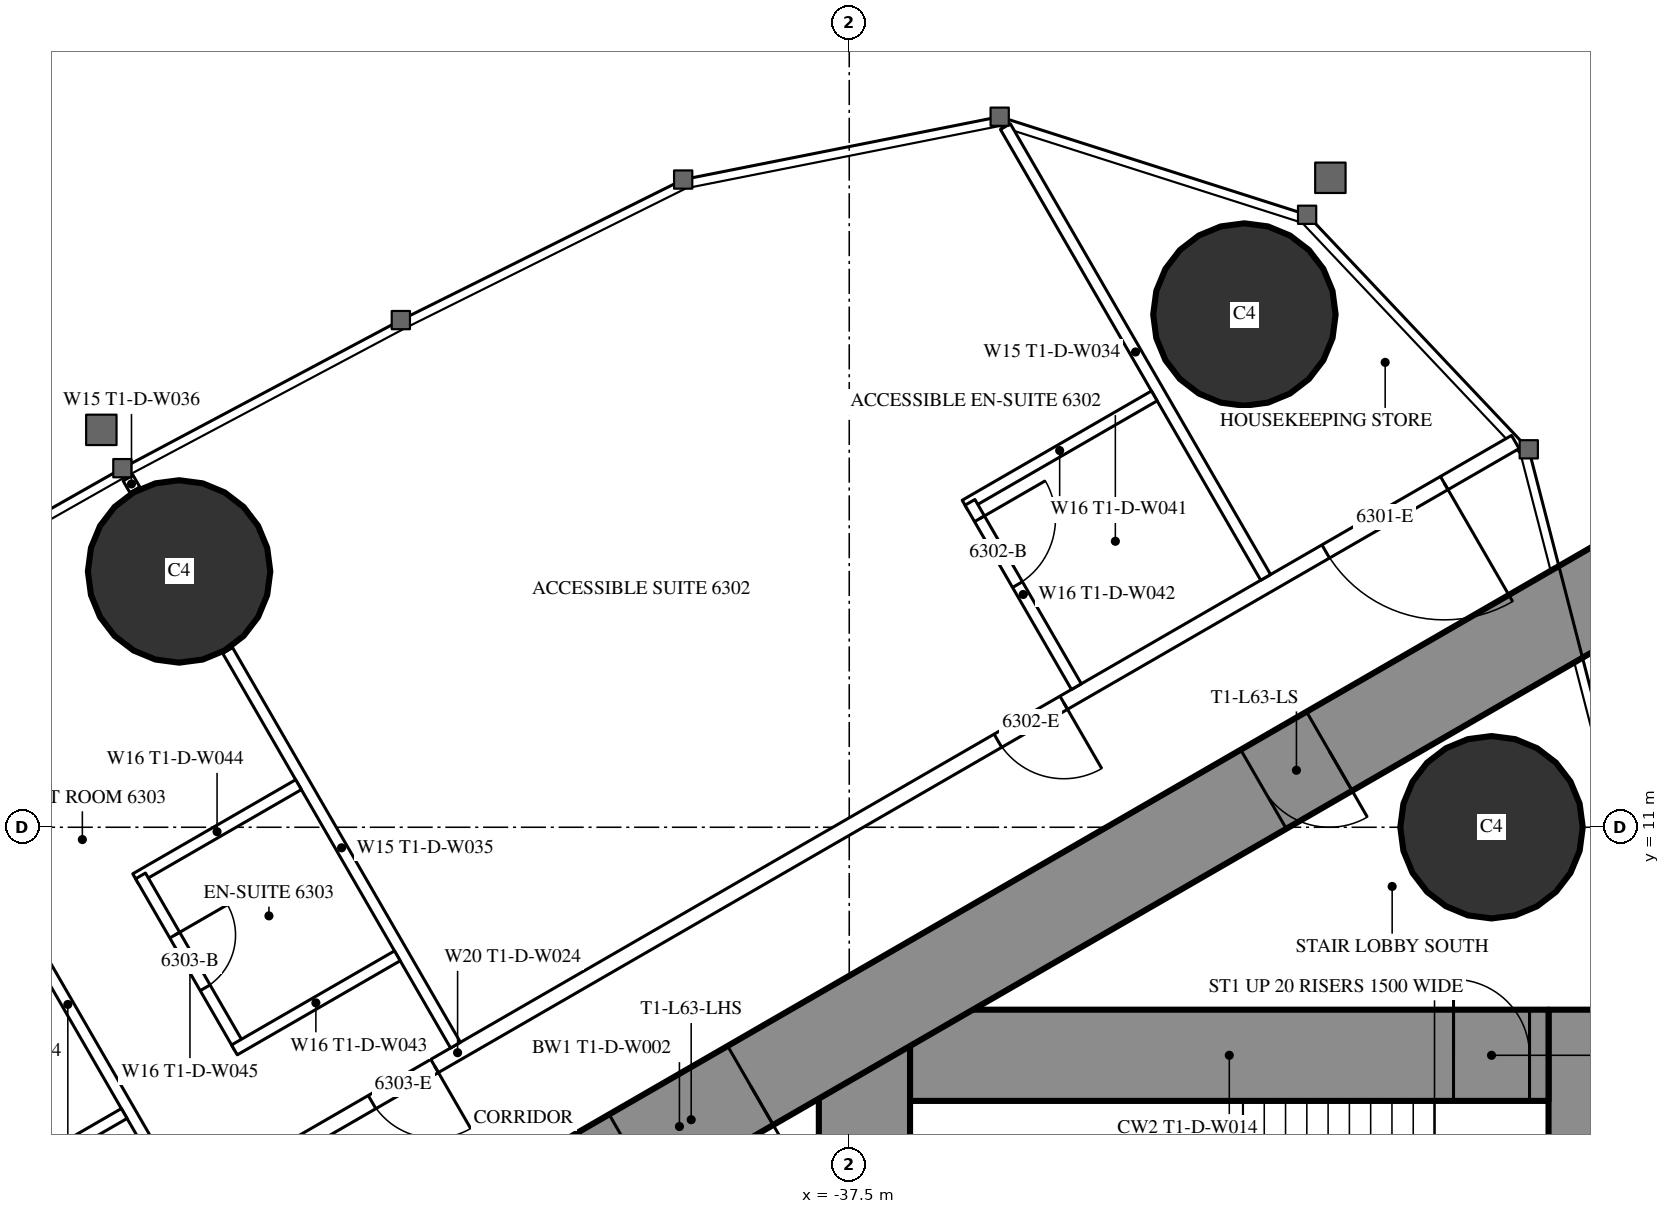
"""IFC4 building model, lengths in metres.
Left out: names, types, materials, properties, quantities, classifications, styles, units other than length and angle.
Written with IfcOpenShell. Run it as: python <this file> out.ifc"""

import sys

from ifc_helpers import new_model, si_unit, direction, frame, frame_2d, origin, origin_2d, place, context, subcontext, project, spatial, rectangle, circle, extrude, element, fill, save


model = new_model("IFC4")
c1 = context("Model", 3, precision=1e-05, world=origin(), true_north=direction((0.0, 1.0)))
c2 = subcontext(c1, "Body", "Model", "MODEL_VIEW")
j1 = project(units=[si_unit("LENGTHUNIT", "METRE"), si_unit("PLANEANGLEUNIT", "RADIAN")], contexts=[c1])
p1 = place(None, origin())
s1 = spatial("IfcSite", under=j1, at=p1, CompositionType="ELEMENT")
p2 = place(p1, origin())
s2 = spatial("IfcBuilding", under=s1, at=p2, CompositionType="ELEMENT")
p3 = place(p2, frame((0.0, 0.0, 236.9)))
s3 = spatial("IfcBuildingStorey", under=s2, at=p3, CompositionType="ELEMENT", Elevation=236.9)
for number, where, z_axis, x_axis in (
    (1, (-32.301, 17.745, 0.0), (0.0, 0.0, 1.0), (1.0, 0.0, 0.0)),
    (2, (-29.05, 11.0, 0.0), (0.0, 0.0, 1.0), (1.0, 0.0, 0.0)),
    (3, (-46.317, 14.365, 0.0), (0.0, 0.0, 1.0), (1.0, 0.0, 0.0)),
):
    element("IfcColumn", number, at=place(p3, frame(where, z_axis=z_axis, x_axis=x_axis)), inside=s3, PredefinedType="COLUMN", context=c2, shape_type="SweptSolid", body=[
        extrude(circle(Radius=1.2, at=origin_2d()), origin(), (0.0, 0.0, 1.0), 3.6),
    ])
p4 = place(p3, frame((-27.9, 8.6, 0.0), z_axis=(0.0, 0.0, 1.0), x_axis=(0.0, -1.0, 0.0)))
e4 = element("IfcWall", 4, at=p4, inside=s3, PredefinedType="SHEAR", context=c2, shape_type="SweptSolid", body=[
    extrude(rectangle(XDim=17.2, YDim=0.8, at=frame_2d((8.6, 0.0))), origin(), (0.0, 0.0, 1.0), 3.6),
])
p5 = place(p4, frame((6.95, 0.0, 0.0)))
e5 = element("IfcOpeningElement", 5, at=p5, cuts=e4, PredefinedType="OPENING", context=c2, shape_type="SweptSolid", body=[
    extrude(rectangle(XDim=0.9, YDim=2.2, at=frame_2d((0.45, 1.1))), frame((0.0, 0.41, 0.0), z_axis=(0.0, -1.0, 0.0), x_axis=(1.0, 0.0, 0.0)), (0.0, 0.0, 1.0), 0.82),
])
p6 = place(p3, frame((-37.3, 8.6, 0.0), z_axis=(0.0, 0.0, 1.0), x_axis=(0.0, -1.0, 0.0)))
e6 = element("IfcWall", 6, at=p6, inside=s3, PredefinedType="SHEAR", context=c2, shape_type="SweptSolid", body=[
    extrude(rectangle(XDim=17.2, YDim=1.2, at=frame_2d((8.6, 0.0))), origin(), (0.0, 0.0, 1.0), 3.6),
])
p7 = place(p6, frame((7.7, 0.0, 0.0)))
e7 = element("IfcOpeningElement", 7, at=p7, cuts=e6, PredefinedType="OPENING", context=c2, shape_type="SweptSolid", body=[
    extrude(rectangle(XDim=1.8, YDim=2.2, at=frame_2d((0.9, 1.1))), frame((0.0, 0.61, 0.0), z_axis=(0.0, -1.0, 0.0), x_axis=(1.0, 0.0, 0.0)), (0.0, 0.0, 1.0), 1.22),
])
p8 = place(p3, frame((-28.3, 8.0, 0.0), z_axis=(0.0, 0.0, 1.0), x_axis=(-1.0, 0.0, 0.0)))
e8 = element("IfcWall", 8, at=p8, inside=s3, PredefinedType="SHEAR", context=c2, shape_type="SweptSolid", body=[
    extrude(rectangle(XDim=8.4, YDim=1.2, at=frame_2d((4.2, 0.0))), origin(), (0.0, 0.0, 1.0), 3.6),
])
p9 = place(p8, frame((0.25, 0.0, 0.0)))
e9 = element("IfcOpeningElement", 9, at=p9, cuts=e8, PredefinedType="OPENING", context=c2, shape_type="SweptSolid", body=[
    extrude(rectangle(XDim=1.0, YDim=2.2, at=frame_2d((0.5, 1.1))), frame((0.0, 0.61, 0.0), z_axis=(0.0, -1.0, 0.0), x_axis=(1.0, 0.0, 0.0)), (0.0, 0.0, 1.0), 1.22),
])
p10 = place(p3, frame((-27.2, 14.3, 0.0), z_axis=(0.0, 0.0, 1.0), x_axis=(-0.866026593062, -0.499997940104, 0.0)))
e10 = element("IfcWall", 10, at=p10, inside=s3, PredefinedType="SHEAR", context=c2, shape_type="SweptSolid", body=[
    extrude(rectangle(XDim=28.946, YDim=1.2, at=frame_2d((14.473, 0.0))), origin(), (0.0, 0.0, 1.0), 3.6),
])
p11 = place(p10, frame((4.6, 0.0, 0.0)))
e11 = element("IfcOpeningElement", 11, at=p11, cuts=e10, PredefinedType="OPENING", context=c2, shape_type="SweptSolid", body=[
    extrude(rectangle(XDim=1.0, YDim=2.2, at=frame_2d((0.5, 1.1))), frame((0.0, 0.61, 0.0), z_axis=(0.0, -1.0, 0.0), x_axis=(1.0, 0.0, 0.0)), (0.0, 0.0, 1.0), 1.22),
])
p12 = place(p10, frame((13.395, 0.0, 0.0)))
e12 = element("IfcOpeningElement", 12, at=p12, cuts=e10, PredefinedType="OPENING", context=c2, shape_type="SweptSolid", body=[
    extrude(rectangle(XDim=1.8, YDim=2.2, at=frame_2d((0.9, 1.1))), frame((0.0, 0.61, 0.0), z_axis=(0.0, -1.0, 0.0), x_axis=(1.0, 0.0, 0.0)), (0.0, 0.0, 1.0), 1.22),
])
p13 = place(p3, frame((-28.737, 16.068, 0.0), z_axis=(0.0, 0.0, 1.0), x_axis=(-0.866026057212, -0.499998868229, 0.0)))
e13 = element("IfcWall", 13, at=p13, inside=s3, PredefinedType="PARTITIONING", context=c2, shape_type="SweptSolid", body=[
    extrude(rectangle(XDim=32.137, YDim=0.2, at=frame_2d((16.068, 0.0))), origin(), (0.0, 0.0, 1.0), 3.35),
])
p14 = place(p13, frame((1.08, 0.0, 0.0)))
e14 = element("IfcOpeningElement", 14, at=p14, cuts=e13, PredefinedType="OPENING", context=c2, shape_type="SweptSolid", body=[
    extrude(rectangle(XDim=1.8, YDim=2.03, at=frame_2d((0.9, 1.015))), frame((0.0, 0.11, 0.0), z_axis=(0.0, -1.0, 0.0), x_axis=(1.0, 0.0, 0.0)), (0.0, 0.0, 1.0), 0.22),
])
p15 = place(p13, frame((6.86, 0.0, 0.0)))
e15 = element("IfcOpeningElement", 15, at=p15, cuts=e13, PredefinedType="OPENING", context=c2, shape_type="SweptSolid", body=[
    extrude(rectangle(XDim=1.0, YDim=2.2, at=frame_2d((0.5, 1.1))), frame((0.0, 0.11, 0.0), z_axis=(0.0, -1.0, 0.0), x_axis=(1.0, 0.0, 0.0)), (0.0, 0.0, 1.0), 0.22),
])
p16 = place(p13, frame((16.418, 0.0, 0.0)))
e16 = element("IfcOpeningElement", 16, at=p16, cuts=e13, PredefinedType="OPENING", context=c2, shape_type="SweptSolid", body=[
    extrude(rectangle(XDim=0.95, YDim=2.2, at=frame_2d((0.475, 1.1))), frame((0.0, 0.11, 0.0), z_axis=(0.0, -1.0, 0.0), x_axis=(1.0, 0.0, 0.0)), (0.0, 0.0, 1.0), 0.22),
])
p17 = place(p13, frame((20.567, 0.0, 0.0)))
e17 = element("IfcOpeningElement", 17, at=p17, cuts=e13, PredefinedType="OPENING", context=c2, shape_type="SweptSolid", body=[
    extrude(rectangle(XDim=0.95, YDim=2.2, at=frame_2d((0.475, 1.1))), frame((0.0, 0.11, 0.0), z_axis=(0.0, -1.0, 0.0), x_axis=(1.0, 0.0, 0.0)), (0.0, 0.0, 1.0), 0.22),
])
p18 = place(p13, frame((27.065, 0.0, 0.0)))
e18 = element("IfcOpeningElement", 18, at=p18, cuts=e13, PredefinedType="OPENING", context=c2, shape_type="SweptSolid", body=[
    extrude(rectangle(XDim=0.95, YDim=2.2, at=frame_2d((0.475, 1.1))), frame((0.0, 0.11, 0.0), z_axis=(0.0, -1.0, 0.0), x_axis=(1.0, 0.0, 0.0)), (0.0, 0.0, 1.0), 0.22),
])
p19 = place(p3, frame((-32.022, 14.287, 0.0), z_axis=(0.0, 0.0, 1.0), x_axis=(-0.50000019414, 0.866025291697, 0.0)))
e19 = element("IfcWall", 19, at=p19, inside=s3, PredefinedType="PARTITIONING", context=c2, shape_type="SweptSolid", body=[
    extrude(rectangle(XDim=6.848, YDim=0.15, at=frame_2d((3.424, 0.0))), origin(), (0.0, 0.0, 1.0), 3.35),
])
p20 = place(p3, frame((-42.68, 8.134, 0.0), z_axis=(0.0, 0.0, 1.0), x_axis=(-0.499984479505, 0.866034364361, 0.0)))
e20 = element("IfcWall", 20, at=p20, inside=s3, PredefinedType="PARTITIONING", context=c2, shape_type="SweptSolid", body=[
    extrude(rectangle(XDim=5.995, YDim=0.15, at=frame_2d((2.998, 0.0))), origin(), (0.0, 0.0, 1.0), 2.45),
])
p21 = place(p3, frame((-46.898, 15.439, 0.0), z_axis=(0.0, 0.0, 1.0), x_axis=(-0.500232303069, 0.865891241997, 0.0)))
e21 = element("IfcWall", 21, at=p21, inside=s3, PredefinedType="PARTITIONING", context=c2, shape_type="SweptSolid", body=[
    extrude(rectangle(XDim=0.18, YDim=0.15, at=frame_2d((0.09, 0.0))), origin(), (0.0, 0.0, 1.0), 2.45),
])
p22 = place(p3, frame((-46.274, 6.059, 0.0), z_axis=(0.0, 0.0, 1.0), x_axis=(-0.500020471368, 0.866013584312, 0.0)))
e22 = element("IfcWall", 22, at=p22, inside=s3, PredefinedType="PARTITIONING", context=c2, shape_type="SweptSolid", body=[
    extrude(rectangle(XDim=6.028, YDim=0.15, at=frame_2d((3.014, 0.0))), origin(), (0.0, 0.0, 1.0), 2.45),
])
p23 = place(p3, frame((-33.487, 16.675, 0.0), z_axis=(0.0, 0.0, 1.0), x_axis=(-0.866039941686, -0.499974818771, 0.0)))
e23 = element("IfcWall", 23, at=p23, inside=s3, PredefinedType="PARTITIONING", context=c2, shape_type="SweptSolid", body=[
    extrude(rectangle(XDim=2.875, YDim=0.15, at=frame_2d((1.438, 0.0))), origin(), (0.0, 0.0, 1.0), 3.35),
])
p24 = place(p3, frame((-34.511, 12.85, 0.0), z_axis=(0.0, 0.0, 1.0), x_axis=(-0.500011755427, 0.866018616679, 0.0)))
e24 = element("IfcWall", 24, at=p24, inside=s3, PredefinedType="PARTITIONING", context=c2, shape_type="SweptSolid", body=[
    extrude(rectangle(XDim=2.8, YDim=0.15, at=frame_2d((1.4, 0.0))), origin(), (0.0, 0.0, 1.0), 3.35),
])
p25 = place(p24, frame((1.55, 0.0, 0.0)))
e25 = element("IfcOpeningElement", 25, at=p25, cuts=e24, PredefinedType="OPENING", context=c2, shape_type="SweptSolid", body=[
    extrude(rectangle(XDim=1.0, YDim=2.2, at=frame_2d((0.5, 1.1))), frame((0.0, 0.085, 0.0), z_axis=(0.0, -1.0, 0.0), x_axis=(1.0, 0.0, 0.0)), (0.0, 0.0, 1.0), 0.17),
])
p26 = place(p3, frame((-44.745, 11.56, 0.0), z_axis=(0.0, 0.0, 1.0), x_axis=(-0.866006523861, -0.500032699561, 0.0)))
e26 = element("IfcWall", 26, at=p26, inside=s3, PredefinedType="PARTITIONING", context=c2, shape_type="SweptSolid", body=[
    extrude(rectangle(XDim=2.475, YDim=0.15, at=frame_2d((1.237, 0.0))), origin(), (0.0, 0.0, 1.0), 3.35),
])
p27 = place(p3, frame((-45.524, 8.109, 0.0), z_axis=(0.0, 0.0, 1.0), x_axis=(-0.49997716683, 0.86603858612, 0.0)))
e27 = element("IfcWall", 27, at=p27, inside=s3, PredefinedType="PARTITIONING", context=c2, shape_type="SweptSolid", body=[
    extrude(rectangle(XDim=2.6, YDim=0.15, at=frame_2d((1.3, 0.0))), origin(), (0.0, 0.0, 1.0), 3.35),
])
p28 = place(p27, frame((0.9, 0.0, 0.0)))
e28 = element("IfcOpeningElement", 28, at=p28, cuts=e27, PredefinedType="OPENING", context=c2, shape_type="SweptSolid", body=[
    extrude(rectangle(XDim=0.8, YDim=2.2, at=frame_2d((0.4, 1.1))), frame((0.0, 0.085, 0.0), z_axis=(0.0, -1.0, 0.0), x_axis=(1.0, 0.0, 0.0)), (0.0, 0.0, 1.0), 0.17),
])
for number, where, z_axis, x_axis in (
    (29, (-43.445, 9.309, 0.0), (0.0, 0.0, 1.0), (-0.866, -0.5, 0.0)),
    (30, (-47.039, 7.234, 0.0), (0.0, 0.0, 1.0), (-0.866, -0.5, 0.0)),
):
    element("IfcWall", number, at=place(p3, frame(where, z_axis=z_axis, x_axis=x_axis)), inside=s3, PredefinedType="PARTITIONING", context=c2, shape_type="SweptSolid", body=[
        extrude(rectangle(XDim=2.475, YDim=0.15, at=frame_2d((1.238, 0.0))), origin(), (0.0, 0.0, 1.0), 3.35),
    ])
p29 = place(p14, origin())
e31 = element("IfcDoor", 31, at=p29, inside=s3, OperationType="DOUBLE_DOOR_SINGLE_SWING", PredefinedType="DOOR", context=c2, shape_type="SweptSolid", body=[
    extrude(rectangle(XDim=1.8, YDim=2.03, at=frame_2d((0.9, 1.015))), frame((0.0, 0.025, 0.0), z_axis=(0.0, -1.0, 0.0), x_axis=(1.0, 0.0, 0.0)), (0.0, 0.0, 1.0), 0.05),
])
fill(e14, e31)
p30 = place(p25, origin())
e32 = element("IfcDoor", 32, at=p30, inside=s3, OperationType="SINGLE_SWING_RIGHT", PredefinedType="DOOR", context=c2, shape_type="SweptSolid", body=[
    extrude(rectangle(XDim=1.0, YDim=2.2, at=frame_2d((0.5, 1.1))), frame((0.0, 0.025, 0.0), z_axis=(0.0, -1.0, 0.0), x_axis=(1.0, 0.0, 0.0)), (0.0, 0.0, 1.0), 0.05),
])
fill(e25, e32)
p31 = place(p15, origin())
e33 = element("IfcDoor", 33, at=p31, inside=s3, OperationType="SINGLE_SWING_LEFT", PredefinedType="DOOR", context=c2, shape_type="SweptSolid", body=[
    extrude(rectangle(XDim=1.0, YDim=2.2, at=frame_2d((0.5, 1.1))), frame((0.0, 0.025, 0.0), z_axis=(0.0, -1.0, 0.0), x_axis=(1.0, 0.0, 0.0)), (0.0, 0.0, 1.0), 0.05),
])
fill(e15, e33)
p32 = place(p28, origin())
e34 = element("IfcDoor", 34, at=p32, inside=s3, OperationType="SINGLE_SWING_RIGHT", PredefinedType="DOOR", context=c2, shape_type="SweptSolid", body=[
    extrude(rectangle(XDim=0.8, YDim=2.2, at=frame_2d((0.4, 1.1))), frame((0.0, 0.025, 0.0), z_axis=(0.0, -1.0, 0.0), x_axis=(1.0, 0.0, 0.0)), (0.0, 0.0, 1.0), 0.05),
])
fill(e28, e34)
p33 = place(p16, origin())
e35 = element("IfcDoor", 35, at=p33, inside=s3, OperationType="SINGLE_SWING_LEFT", PredefinedType="DOOR", context=c2, shape_type="SweptSolid", body=[
    extrude(rectangle(XDim=0.95, YDim=2.2, at=frame_2d((0.475, 1.1))), frame((0.0, 0.025, 0.0), z_axis=(0.0, -1.0, 0.0), x_axis=(1.0, 0.0, 0.0)), (0.0, 0.0, 1.0), 0.05),
])
fill(e16, e35)
p34 = place(p11, origin())
e36 = element("IfcDoor", 36, at=p34, inside=s3, OperationType="SINGLE_SWING_LEFT", PredefinedType="DOOR", context=c2, shape_type="SweptSolid", body=[
    extrude(rectangle(XDim=1.0, YDim=2.2, at=frame_2d((0.5, 1.1))), frame((0.0, 0.025, 0.0), z_axis=(0.0, -1.0, 0.0), x_axis=(1.0, 0.0, 0.0)), (0.0, 0.0, 1.0), 0.05),
])
fill(e11, e36)
p35 = place(p12, origin())
e37 = element("IfcDoor", 37, at=p35, inside=s3, OperationType="DOUBLE_DOOR_SINGLE_SWING", PredefinedType="DOOR", context=c2, shape_type="SweptSolid", body=[
    extrude(rectangle(XDim=1.8, YDim=2.2, at=frame_2d((0.9, 1.1))), frame((0.0, 0.025, 0.0), z_axis=(0.0, -1.0, 0.0), x_axis=(1.0, 0.0, 0.0)), (0.0, 0.0, 1.0), 0.05),
])
fill(e12, e37)
p36 = place(p9, origin())
e38 = element("IfcDoor", 38, at=p36, inside=s3, OperationType="SINGLE_SWING_RIGHT", PredefinedType="DOOR", context=c2, shape_type="SweptSolid", body=[
    extrude(rectangle(XDim=1.0, YDim=2.2, at=frame_2d((0.5, 1.1))), frame((0.0, 0.025, 0.0), z_axis=(0.0, -1.0, 0.0), x_axis=(1.0, 0.0, 0.0)), (0.0, 0.0, 1.0), 0.05),
])
fill(e9, e38)
save(model, sys.argv[1])
